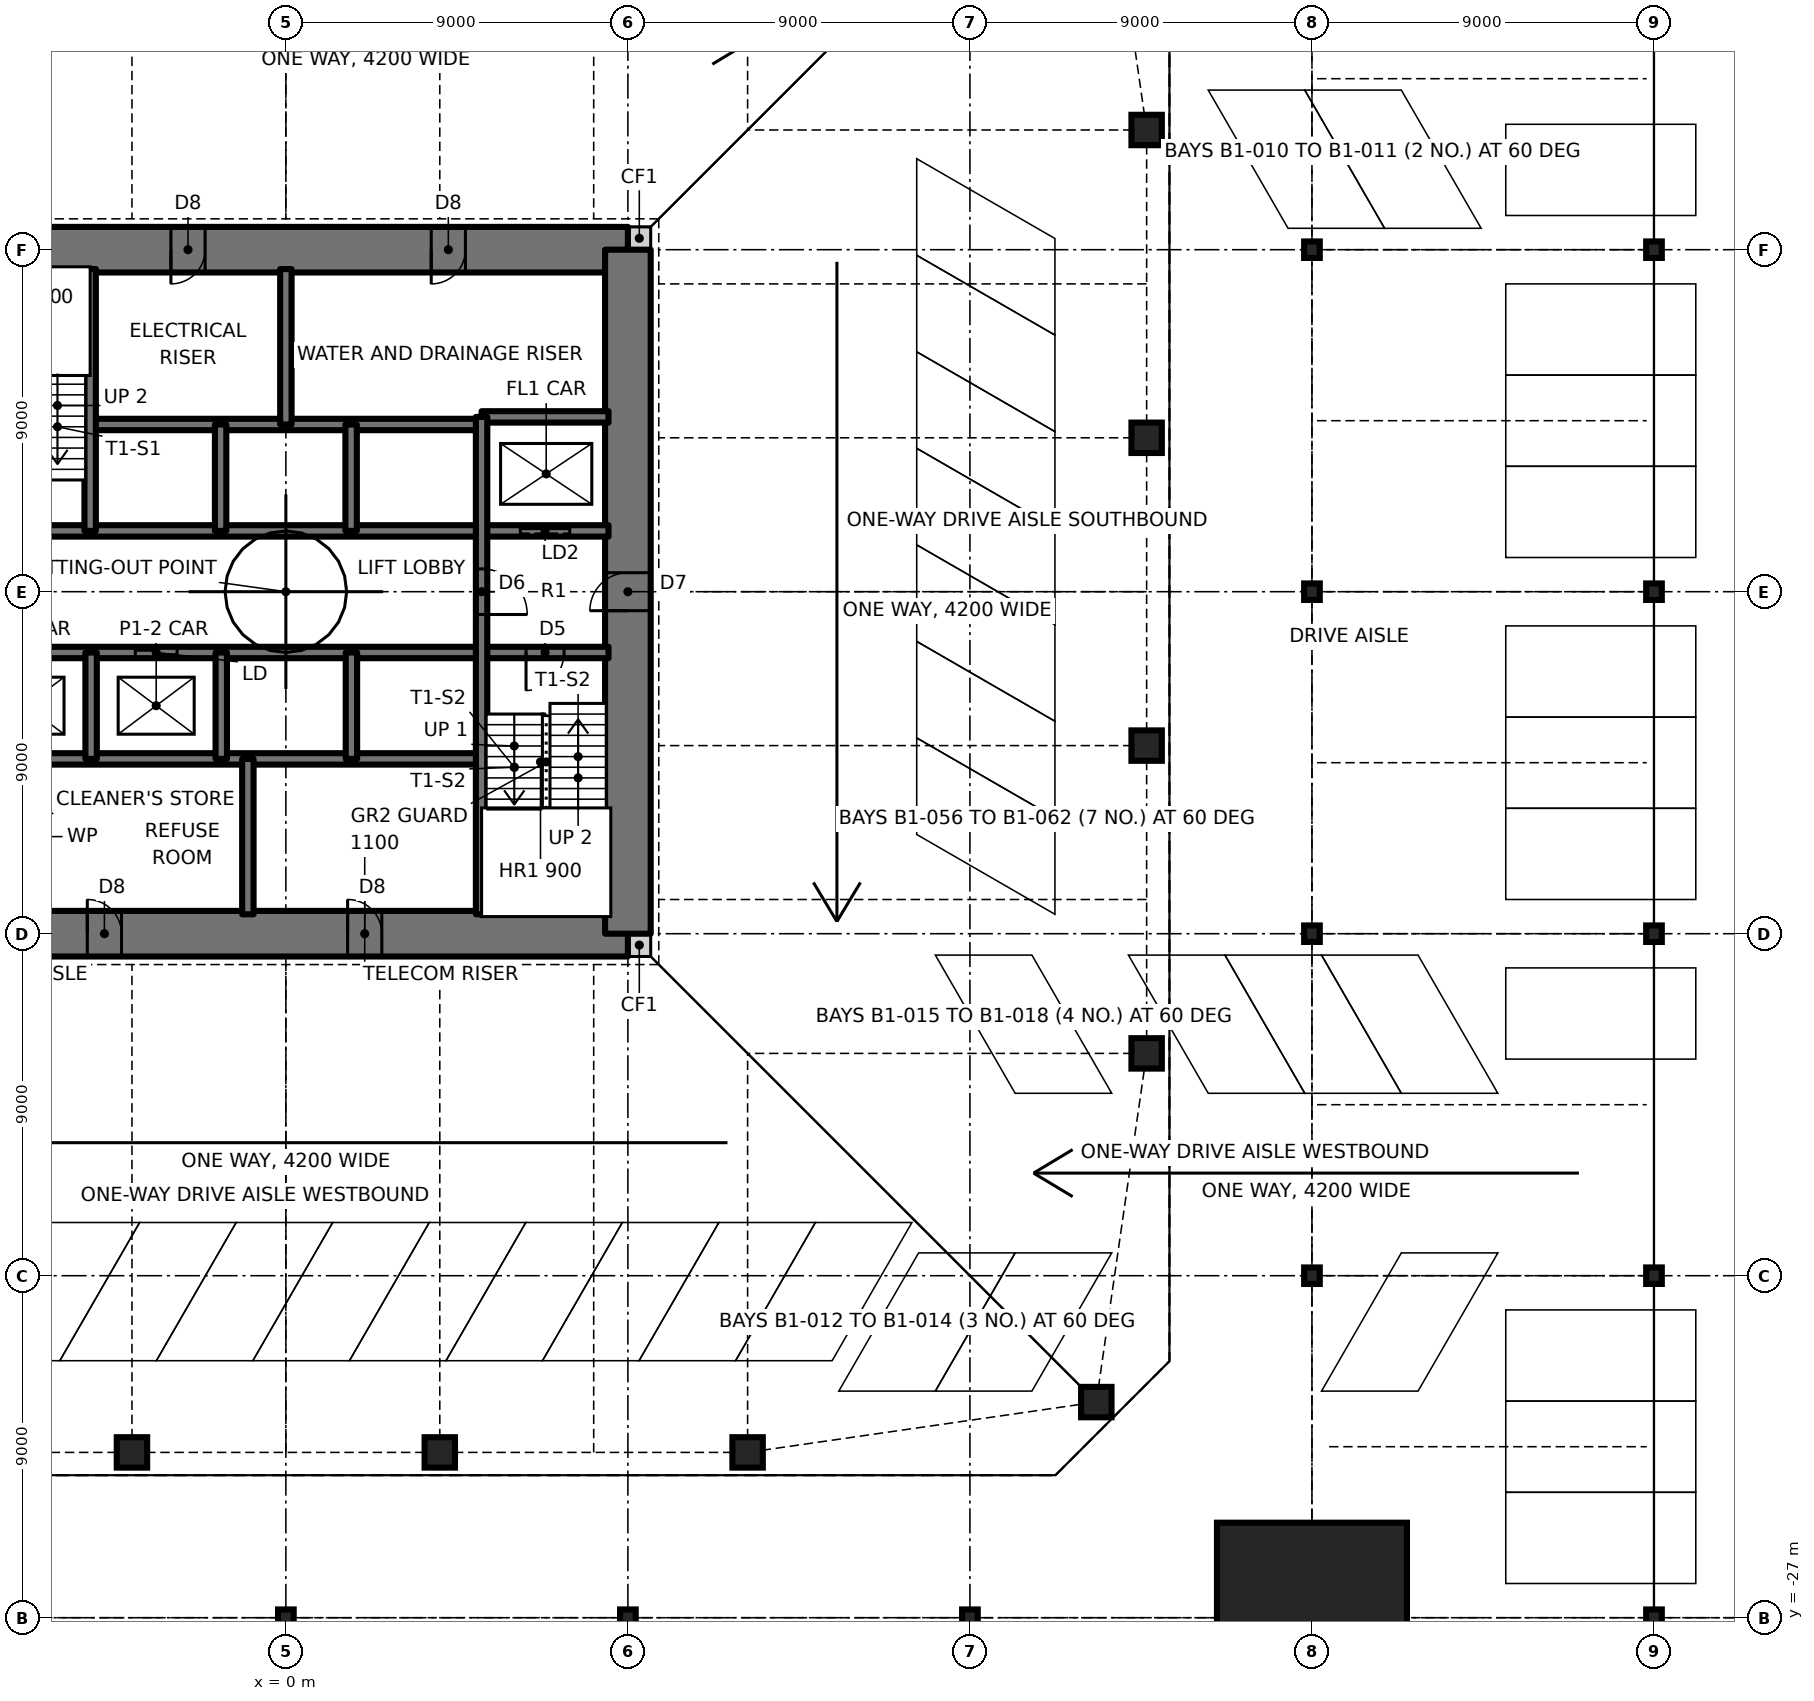
"""IFC4 building model, lengths in metres.
Left out: names, types, materials, properties, quantities, classifications, styles, units other than length and angle.
Written with IfcOpenShell. Run it as: python <this file> out.ifc"""

import sys

from ifc_helpers import new_model, si_unit, direction, frame, frame_2d, origin, origin_2d, place, context, subcontext, project, spatial, rectangle, hollow_rectangle, i_section, extrude, element, fill, save


model = new_model("IFC4")
c1 = context("Model", 3, precision=1e-05, world=origin(), true_north=direction((0.0, 1.0)))
c2 = subcontext(c1, "Body", "Model", "MODEL_VIEW")
j1 = project(units=[si_unit("LENGTHUNIT", "METRE"), si_unit("PLANEANGLEUNIT", "RADIAN")], contexts=[c1])
p1 = place(None, origin())
s1 = spatial("IfcSite", under=j1, at=p1, CompositionType="ELEMENT")
p2 = place(p1, origin())
s2 = spatial("IfcBuilding", under=s1, at=p2, CompositionType="ELEMENT")
p3 = place(p2, frame((0.0, 0.0, -3.6)))
s3 = spatial("IfcBuildingStorey", under=s2, at=p3, CompositionType="ELEMENT", Elevation=-3.6)
for number, where, z_axis, x_axis in (
    (1, (-4.05, -22.65, 0.0), (0.0, 0.0, 1.0), (1.0, 0.0, 0.0)),
    (2, (4.05, -22.65, 0.0), (0.0, 0.0, 1.0), (1.0, 0.0, 0.0)),
    (3, (12.15, -22.65, 0.0), (0.0, 0.0, 1.0), (1.0, 0.0, 0.0)),
    (4, (21.326, -21.326, 0.0), (0.0, 0.0, 1.0), (1.0, 0.0, 0.0)),
    (5, (22.65, -12.15, 0.0), (0.0, 0.0, 1.0), (1.0, 0.0, 0.0)),
    (6, (22.65, -4.05, 0.0), (0.0, 0.0, 1.0), (1.0, 0.0, 0.0)),
    (7, (22.65, 4.05, 0.0), (0.0, 0.0, 1.0), (1.0, 0.0, 0.0)),
    (8, (22.65, 12.15, 0.0), (0.0, 0.0, 1.0), (1.0, 0.0, 0.0)),
):
    element("IfcColumn", number, at=place(p3, frame(where, z_axis=z_axis, x_axis=x_axis)), inside=s3, PredefinedType="COLUMN", context=c2, shape_type="SweptSolid", body=[
        extrude(hollow_rectangle(XDim=0.8, YDim=0.8, WallThickness=0.09, at=origin_2d()), origin(), (0.0, 0.0, 1.0), 3.6),
    ])
p4 = place(p3, frame((27.0, -27.0, 0.0), z_axis=(0.0, 0.0, 1.0), x_axis=(1.0, 0.0, 0.0)))
e9 = element("IfcColumn", 9, at=p4, inside=s3, PredefinedType="COLUMN", context=c2, shape_type="SweptSolid", body=[
    extrude(rectangle(XDim=5.0, YDim=5.0, at=origin_2d()), origin(), (0.0, 0.0, 1.0), 3.6),
    extrude(i_section(OverallWidth=0.478, OverallDepth=0.599, WebThickness=0.1, FlangeThickness=0.14, at=origin_2d()), origin(), (0.0, 0.0, 1.0), 3.6),
])
for number, where, z_axis, x_axis in (
    (10, (0.0, -27.0, 0.0), (0.0, 0.0, 1.0), (1.0, 0.0, 0.0)),
    (11, (9.0, -27.0, 0.0), (0.0, 0.0, 1.0), (1.0, 0.0, 0.0)),
    (12, (18.0, -27.0, 0.0), (0.0, 0.0, 1.0), (1.0, 0.0, 0.0)),
    (13, (27.0, -18.0, 0.0), (0.0, 0.0, 1.0), (1.0, 0.0, 0.0)),
    (14, (27.0, -9.0, 0.0), (0.0, 0.0, 1.0), (1.0, 0.0, 0.0)),
    (15, (27.0, 0.0, 0.0), (0.0, 0.0, 1.0), (1.0, 0.0, 0.0)),
    (16, (27.0, 9.0, 0.0), (0.0, 0.0, 1.0), (1.0, 0.0, 0.0)),
    (17, (36.0, -27.0, 0.0), (0.0, 0.0, 1.0), (1.0, 0.0, 0.0)),
    (18, (36.0, -18.0, 0.0), (0.0, 0.0, 1.0), (1.0, 0.0, 0.0)),
    (19, (36.0, -9.0, 0.0), (0.0, 0.0, 1.0), (1.0, 0.0, 0.0)),
    (20, (36.0, 0.0, 0.0), (0.0, 0.0, 1.0), (1.0, 0.0, 0.0)),
    (21, (36.0, 9.0, 0.0), (0.0, 0.0, 1.0), (1.0, 0.0, 0.0)),
):
    element("IfcColumn", number, at=place(p3, frame(where, z_axis=z_axis, x_axis=x_axis)), inside=s3, PredefinedType="COLUMN", context=c2, shape_type="SweptSolid", body=[
        extrude(i_section(OverallWidth=0.411, OverallDepth=0.434, WebThickness=0.036, FlangeThickness=0.057, at=origin_2d()), origin(), (0.0, 0.0, 1.0), 3.6),
    ])
for number, where, z_axis, x_axis in (
    (22, (9.0, -9.3, 0.0), (0.0, 0.0, 1.0), (1.0, 0.0, 0.0)),
    (23, (9.0, 9.3, 0.0), (0.0, 0.0, 1.0), (1.0, 0.0, 0.0)),
):
    element("IfcWall", number, at=place(p3, frame(where, z_axis=z_axis, x_axis=x_axis)), inside=s3, PredefinedType="SOLIDWALL", context=c2, shape_type="SweptSolid", body=[
        extrude(rectangle(XDim=0.6, YDim=0.6, at=frame_2d((0.3, 0.0))), origin(), (0.0, 0.0, 1.0), 3.6),
    ])
p5 = place(p3, frame((-9.0, -9.0, 0.0), z_axis=(0.0, 0.0, 1.0), x_axis=(1.0, 0.0, 0.0)))
e24 = element("IfcWall", 24, at=p5, inside=s3, PredefinedType="SHEAR", context=c2, shape_type="SweptSolid", body=[
    extrude(rectangle(XDim=18.0, YDim=1.2, at=frame_2d((9.0, 0.0))), origin(), (0.0, 0.0, 1.0), 3.6),
])
p6 = place(p5, frame((3.775, 0.0, 0.0)))
e25 = element("IfcOpeningElement", 25, at=p6, cuts=e24, PredefinedType="OPENING", context=c2, shape_type="SweptSolid", body=[
    extrude(rectangle(XDim=0.9, YDim=2.1, at=frame_2d((0.45, 1.05))), frame((0.0, 0.61, 0.0), z_axis=(0.0, -1.0, 0.0), x_axis=(1.0, 0.0, 0.0)), (0.0, 0.0, 1.0), 1.22),
])
p7 = place(p5, frame((10.625, 0.0, 0.0)))
e26 = element("IfcOpeningElement", 26, at=p7, cuts=e24, PredefinedType="OPENING", context=c2, shape_type="SweptSolid", body=[
    extrude(rectangle(XDim=0.9, YDim=2.1, at=frame_2d((0.45, 1.05))), frame((0.0, 0.61, 0.0), z_axis=(0.0, -1.0, 0.0), x_axis=(1.0, 0.0, 0.0)), (0.0, 0.0, 1.0), 1.22),
])
p8 = place(p3, frame((9.0, 9.0, 0.0), z_axis=(0.0, 0.0, 1.0), x_axis=(-1.0, 0.0, 0.0)))
e27 = element("IfcWall", 27, at=p8, inside=s3, PredefinedType="SHEAR", context=c2, shape_type="SweptSolid", body=[
    extrude(rectangle(XDim=18.0, YDim=1.2, at=frame_2d((9.0, 0.0))), origin(), (0.0, 0.0, 1.0), 3.6),
])
p9 = place(p8, frame((11.125, 0.0, 0.0)))
e28 = element("IfcOpeningElement", 28, at=p9, cuts=e27, PredefinedType="OPENING", context=c2, shape_type="SweptSolid", body=[
    extrude(rectangle(XDim=0.9, YDim=2.1, at=frame_2d((0.45, 1.05))), frame((0.0, 0.61, 0.0), z_axis=(0.0, -1.0, 0.0), x_axis=(1.0, 0.0, 0.0)), (0.0, 0.0, 1.0), 1.22),
])
p10 = place(p8, frame((4.275, 0.0, 0.0)))
e29 = element("IfcOpeningElement", 29, at=p10, cuts=e27, PredefinedType="OPENING", context=c2, shape_type="SweptSolid", body=[
    extrude(rectangle(XDim=0.9, YDim=2.1, at=frame_2d((0.45, 1.05))), frame((0.0, 0.61, 0.0), z_axis=(0.0, -1.0, 0.0), x_axis=(1.0, 0.0, 0.0)), (0.0, 0.0, 1.0), 1.22),
])
p11 = place(p3, frame((9.0, -9.0, 0.0), z_axis=(0.0, 0.0, 1.0), x_axis=(0.0, 1.0, 0.0)))
e30 = element("IfcWall", 30, at=p11, inside=s3, PredefinedType="SHEAR", context=c2, shape_type="SweptSolid", body=[
    extrude(rectangle(XDim=18.0, YDim=1.2, at=frame_2d((9.0, 0.0))), origin(), (0.0, 0.0, 1.0), 3.6),
])
p12 = place(p11, frame((8.5, 0.0, 0.0)))
e31 = element("IfcOpeningElement", 31, at=p12, cuts=e30, PredefinedType="OPENING", context=c2, shape_type="SweptSolid", body=[
    extrude(rectangle(XDim=1.0, YDim=2.1, at=frame_2d((0.5, 1.05))), frame((0.0, 0.61, 0.0), z_axis=(0.0, -1.0, 0.0), x_axis=(1.0, 0.0, 0.0)), (0.0, 0.0, 1.0), 1.22),
])
p13 = place(p3, frame((-8.49, -4.4, 0.0), z_axis=(0.0, 0.0, 1.0), x_axis=(1.0, 0.0, 0.0)))
e32 = element("IfcWall", 32, at=p13, inside=s3, PredefinedType="SOLIDWALL", context=c2, shape_type="SweptSolid", body=[
    extrude(rectangle(XDim=13.64, YDim=0.3, at=frame_2d((6.82, 0.0))), origin(), (0.0, 0.0, 1.0), 3.6),
])
p14 = place(p3, frame((-8.49, -1.6, 0.0), z_axis=(0.0, 0.0, 1.0), x_axis=(1.0, 0.0, 0.0)))
e33 = element("IfcWall", 33, at=p14, inside=s3, PredefinedType="SOLIDWALL", context=c2, shape_type="SweptSolid", body=[
    extrude(rectangle(XDim=16.98, YDim=0.3, at=frame_2d((8.49, 0.0))), origin(), (0.0, 0.0, 1.0), 3.6),
])
p15 = place(p14, frame((14.81, 0.0, 0.0)))
e34 = element("IfcOpeningElement", 34, at=p15, cuts=e33, PredefinedType="OPENING", context=c2, shape_type="SweptSolid", body=[
    extrude(rectangle(XDim=1.0, YDim=2.1, at=frame_2d((0.5, 1.05))), frame((0.0, 0.16, 0.0), z_axis=(0.0, -1.0, 0.0), x_axis=(1.0, 0.0, 0.0)), (0.0, 0.0, 1.0), 0.32),
])
p16 = place(p14, frame((1.133, 0.0, 0.0)))
e35 = element("IfcOpeningElement", 35, at=p16, cuts=e33, PredefinedType="OPENING", context=c2, shape_type="SweptSolid", body=[
    extrude(rectangle(XDim=1.1, YDim=2.1, at=frame_2d((0.55, 1.05))), frame((0.0, 0.16, 0.0), z_axis=(0.0, -1.0, 0.0), x_axis=(1.0, 0.0, 0.0)), (0.0, 0.0, 1.0), 0.32),
])
p17 = place(p14, frame((4.528, 0.0, 0.0)))
e36 = element("IfcOpeningElement", 36, at=p17, cuts=e33, PredefinedType="OPENING", context=c2, shape_type="SweptSolid", body=[
    extrude(rectangle(XDim=1.1, YDim=2.1, at=frame_2d((0.55, 1.05))), frame((0.0, 0.16, 0.0), z_axis=(0.0, -1.0, 0.0), x_axis=(1.0, 0.0, 0.0)), (0.0, 0.0, 1.0), 0.32),
])
p18 = place(p3, frame((-8.49, 1.6, 0.0), z_axis=(0.0, 0.0, 1.0), x_axis=(1.0, 0.0, 0.0)))
e37 = element("IfcWall", 37, at=p18, inside=s3, PredefinedType="SOLIDWALL", context=c2, shape_type="SweptSolid", body=[
    extrude(rectangle(XDim=16.98, YDim=0.3, at=frame_2d((8.49, 0.0))), origin(), (0.0, 0.0, 1.0), 3.6),
])
p19 = place(p18, frame((1.17, 0.0, 0.0)))
e38 = element("IfcOpeningElement", 38, at=p19, cuts=e37, PredefinedType="OPENING", context=c2, shape_type="SweptSolid", body=[
    extrude(rectangle(XDim=1.0, YDim=2.1, at=frame_2d((0.5, 1.05))), frame((0.0, 0.16, 0.0), z_axis=(0.0, -1.0, 0.0), x_axis=(1.0, 0.0, 0.0)), (0.0, 0.0, 1.0), 0.32),
])
p20 = place(p18, frame((14.66, 0.0, 0.0)))
e39 = element("IfcOpeningElement", 39, at=p20, cuts=e37, PredefinedType="OPENING", context=c2, shape_type="SweptSolid", body=[
    extrude(rectangle(XDim=1.3, YDim=2.1, at=frame_2d((0.65, 1.05))), frame((0.0, 0.16, 0.0), z_axis=(0.0, -1.0, 0.0), x_axis=(1.0, 0.0, 0.0)), (0.0, 0.0, 1.0), 0.32),
])
p21 = place(p3, frame((-5.15, 4.4, 0.0), z_axis=(0.0, 0.0, 1.0), x_axis=(1.0, 0.0, 0.0)))
e40 = element("IfcWall", 40, at=p21, inside=s3, PredefinedType="SOLIDWALL", context=c2, shape_type="SweptSolid", body=[
    extrude(rectangle(XDim=10.3, YDim=0.3, at=frame_2d((5.15, 0.0))), origin(), (0.0, 0.0, 1.0), 3.6),
])
p22 = place(p3, frame((5.15, 4.6, 0.0), z_axis=(0.0, 0.0, 1.0), x_axis=(1.0, 0.0, 0.0)))
e41 = element("IfcWall", 41, at=p22, inside=s3, PredefinedType="SOLIDWALL", context=c2, shape_type="SweptSolid", body=[
    extrude(rectangle(XDim=3.34, YDim=0.3, at=frame_2d((1.67, 0.0))), origin(), (0.0, 0.0, 1.0), 3.6),
])
p23 = place(p3, frame((5.15, -8.49, 0.0), z_axis=(0.0, 0.0, 1.0), x_axis=(0.0, 1.0, 0.0)))
e42 = element("IfcWall", 42, at=p23, inside=s3, PredefinedType="SOLIDWALL", context=c2, shape_type="SweptSolid", body=[
    extrude(rectangle(XDim=13.09, YDim=0.3, at=frame_2d((6.545, 0.0))), origin(), (0.0, 0.0, 1.0), 3.6),
])
p24 = place(p23, frame((7.89, 0.0, 0.0)))
e43 = element("IfcOpeningElement", 43, at=p24, cuts=e42, PredefinedType="OPENING", context=c2, shape_type="SweptSolid", body=[
    extrude(rectangle(XDim=1.2, YDim=2.1, at=frame_2d((0.6, 1.05))), frame((0.0, 0.16, 0.0), z_axis=(0.0, -1.0, 0.0), x_axis=(1.0, 0.0, 0.0)), (0.0, 0.0, 1.0), 0.32),
])
for number, where, z_axis, x_axis in (
    (44, (1.725, -4.4, 0.0), (0.0, 0.0, 1.0), (0.0, 1.0, 0.0)),
    (45, (1.717, 1.6, 0.0), (0.0, 0.0, 1.0), (0.0, 1.0, 0.0)),
):
    element("IfcWall", number, at=place(p3, frame(where, z_axis=z_axis, x_axis=x_axis)), inside=s3, PredefinedType="SOLIDWALL", context=c2, shape_type="SweptSolid", body=[
        extrude(rectangle(XDim=2.8, YDim=0.3, at=frame_2d((1.4, 0.0))), origin(), (0.0, 0.0, 1.0), 3.6),
    ])
for number, where, z_axis, x_axis in (
    (46, (0.0, 4.4, 0.0), (0.0, 0.0, 1.0), (0.0, 1.0, 0.0)),
    (47, (-1.0, -8.49, 0.0), (0.0, 0.0, 1.0), (0.0, 1.0, 0.0)),
):
    element("IfcWall", number, at=place(p3, frame(where, z_axis=z_axis, x_axis=x_axis)), inside=s3, PredefinedType="SOLIDWALL", context=c2, shape_type="SweptSolid", body=[
        extrude(rectangle(XDim=4.09, YDim=0.3, at=frame_2d((2.045, 0.0))), origin(), (0.0, 0.0, 1.0), 3.6),
    ])
for number, where, z_axis, x_axis in (
    (48, (-1.7, -4.4, 0.0), (0.0, 0.0, 1.0), (0.0, 1.0, 0.0)),
    (49, (-1.717, 1.6, 0.0), (0.0, 0.0, 1.0), (0.0, 1.0, 0.0)),
    (50, (-5.125, -4.4, 0.0), (0.0, 0.0, 1.0), (0.0, 1.0, 0.0)),
):
    element("IfcWall", number, at=place(p3, frame(where, z_axis=z_axis, x_axis=x_axis)), inside=s3, PredefinedType="SOLIDWALL", context=c2, shape_type="SweptSolid", body=[
        extrude(rectangle(XDim=2.8, YDim=0.3, at=frame_2d((1.4, 0.0))), origin(), (0.0, 0.0, 1.0), 3.6),
    ])
p25 = place(p3, frame((-5.15, 1.6, 0.0), z_axis=(0.0, 0.0, 1.0), x_axis=(0.0, 1.0, 0.0)))
e51 = element("IfcWall", 51, at=p25, inside=s3, PredefinedType="SOLIDWALL", context=c2, shape_type="SweptSolid", body=[
    extrude(rectangle(XDim=6.89, YDim=0.3, at=frame_2d((3.445, 0.0))), origin(), (0.0, 0.0, 1.0), 3.6),
])
p26 = place(p15, frame((1.0, 0.0, 0.0), z_axis=(0.0, 0.0, 1.0), x_axis=(-1.0, 0.0, 0.0)))
e52 = element("IfcDoor", 52, at=p26, inside=s3, OperationType="SINGLE_SWING_RIGHT", PredefinedType="DOOR", context=c2, shape_type="SweptSolid", body=[
    extrude(rectangle(XDim=1.0, YDim=2.1, at=frame_2d((0.5, 1.05))), frame((0.0, 0.025, 0.0), z_axis=(0.0, -1.0, 0.0), x_axis=(1.0, 0.0, 0.0)), (0.0, 0.0, 1.0), 0.05),
])
fill(e34, e52)
p27 = place(p24, frame((1.2, 0.0, 0.0), z_axis=(0.0, 0.0, 1.0), x_axis=(-1.0, 0.0, 0.0)))
e53 = element("IfcDoor", 53, at=p27, inside=s3, OperationType="SINGLE_SWING_RIGHT", PredefinedType="DOOR", context=c2, shape_type="SweptSolid", body=[
    extrude(rectangle(XDim=1.2, YDim=2.1, at=frame_2d((0.6, 1.05))), frame((0.0, 0.025, 0.0), z_axis=(0.0, -1.0, 0.0), x_axis=(1.0, 0.0, 0.0)), (0.0, 0.0, 1.0), 0.05),
])
fill(e43, e53)
p28 = place(p12, origin())
e54 = element("IfcDoor", 54, at=p28, inside=s3, OperationType="SINGLE_SWING_LEFT", PredefinedType="DOOR", context=c2, shape_type="SweptSolid", body=[
    extrude(rectangle(XDim=1.0, YDim=2.1, at=frame_2d((0.5, 1.05))), frame((0.0, 0.025, 0.0), z_axis=(0.0, -1.0, 0.0), x_axis=(1.0, 0.0, 0.0)), (0.0, 0.0, 1.0), 0.05),
])
fill(e31, e54)
p29 = place(p9, origin())
e55 = element("IfcDoor", 55, at=p29, inside=s3, OperationType="SINGLE_SWING_RIGHT", PredefinedType="DOOR", context=c2, shape_type="SweptSolid", body=[
    extrude(rectangle(XDim=0.9, YDim=2.1, at=frame_2d((0.45, 1.05))), frame((0.0, 0.025, 0.0), z_axis=(0.0, -1.0, 0.0), x_axis=(1.0, 0.0, 0.0)), (0.0, 0.0, 1.0), 0.05),
])
fill(e28, e55)
p30 = place(p10, origin())
e56 = element("IfcDoor", 56, at=p30, inside=s3, OperationType="SINGLE_SWING_RIGHT", PredefinedType="DOOR", context=c2, shape_type="SweptSolid", body=[
    extrude(rectangle(XDim=0.9, YDim=2.1, at=frame_2d((0.45, 1.05))), frame((0.0, 0.025, 0.0), z_axis=(0.0, -1.0, 0.0), x_axis=(1.0, 0.0, 0.0)), (0.0, 0.0, 1.0), 0.05),
])
fill(e29, e56)
p31 = place(p6, origin())
e57 = element("IfcDoor", 57, at=p31, inside=s3, OperationType="SINGLE_SWING_LEFT", PredefinedType="DOOR", context=c2, shape_type="SweptSolid", body=[
    extrude(rectangle(XDim=0.9, YDim=2.1, at=frame_2d((0.45, 1.05))), frame((0.0, 0.025, 0.0), z_axis=(0.0, -1.0, 0.0), x_axis=(1.0, 0.0, 0.0)), (0.0, 0.0, 1.0), 0.05),
])
fill(e25, e57)
p32 = place(p7, origin())
e58 = element("IfcDoor", 58, at=p32, inside=s3, OperationType="SINGLE_SWING_LEFT", PredefinedType="DOOR", context=c2, shape_type="SweptSolid", body=[
    extrude(rectangle(XDim=0.9, YDim=2.1, at=frame_2d((0.45, 1.05))), frame((0.0, 0.025, 0.0), z_axis=(0.0, -1.0, 0.0), x_axis=(1.0, 0.0, 0.0)), (0.0, 0.0, 1.0), 0.05),
])
fill(e26, e58)
p33 = place(p17, origin())
e59 = element("IfcDoor", 59, at=p33, inside=s3, OperationType="DOUBLE_DOOR_SLIDING", PredefinedType="DOOR", context=c2, shape_type="SweptSolid", body=[
    extrude(rectangle(XDim=1.1, YDim=2.1, at=frame_2d((0.55, 1.05))), frame((0.0, 0.025, 0.0), z_axis=(0.0, -1.0, 0.0), x_axis=(1.0, 0.0, 0.0)), (0.0, 0.0, 1.0), 0.05),
])
fill(e36, e59)
p34 = place(p20, origin())
e60 = element("IfcDoor", 60, at=p34, inside=s3, OperationType="SLIDING_TO_LEFT", PredefinedType="DOOR", context=c2, shape_type="SweptSolid", body=[
    extrude(rectangle(XDim=1.3, YDim=2.1, at=frame_2d((0.65, 1.05))), frame((0.0, 0.025, 0.0), z_axis=(0.0, -1.0, 0.0), x_axis=(1.0, 0.0, 0.0)), (0.0, 0.0, 1.0), 0.05),
])
fill(e39, e60)
save(model, sys.argv[1])
